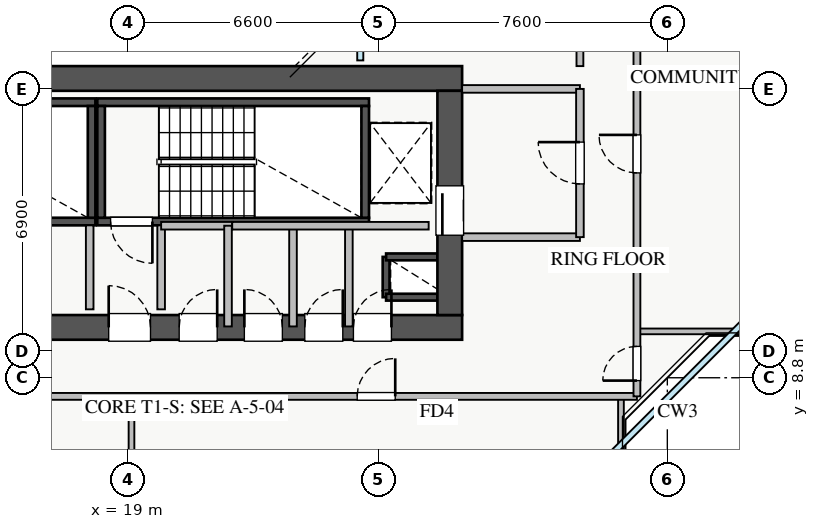
"""IFC4 building model, lengths in metres.
Left out: names, types, materials, properties, quantities, classifications, styles, units other than length and angle.
Written with IfcOpenShell. Run it as: python <this file> out.ifc"""

import sys

from ifc_helpers import new_model, si_unit, direction, frame, frame_2d, origin, place, context, subcontext, project, spatial, rectangle, extrude, source, transform, mapped, element, fill, save


model = new_model("IFC4")
c1 = context("Model", 3, precision=1e-05, world=origin(), true_north=direction((0.0, 1.0)))
c2 = subcontext(c1, "Body", "Model", "MODEL_VIEW")
j1 = project(units=[si_unit("LENGTHUNIT", "METRE"), si_unit("PLANEANGLEUNIT", "RADIAN")], contexts=[c1])
p1 = place(None, origin())
s1 = spatial("IfcSite", under=j1, at=p1, CompositionType="ELEMENT")
p2 = place(p1, origin())
s2 = spatial("IfcBuilding", under=s1, at=p2, CompositionType="ELEMENT")
p3 = place(p2, frame((0.0, 0.0, 103.5)))
s3 = spatial("IfcBuildingStorey", under=s2, at=p3, CompositionType="ELEMENT", Elevation=103.5)
p4 = place(p3, frame((25.8, 10.92, 0.0), z_axis=(0.0, 0.0, 1.0), x_axis=(0.0, 1.0, 0.0)))
e1 = element("IfcWall", 1, at=p4, inside=s3, PredefinedType="SHEAR", context=c2, shape_type="SweptSolid", body=[
    extrude(rectangle(XDim=1.06, YDim=0.18, at=frame_2d((0.53, 0.0))), origin(), (0.0, 0.0, 1.0), 3.07),
])
for number, where, z_axis, x_axis in (
    (2, (25.8, 11.98, 0.0), (0.0, 0.0, 1.0), (1.0, 0.0, 0.0)),
    (3, (25.8, 10.92, 0.0), (0.0, 0.0, 1.0), (1.0, 0.0, 0.0)),
):
    element("IfcWall", number, at=place(p3, frame(where, z_axis=z_axis, x_axis=x_axis)), inside=s3, PredefinedType="SHEAR", context=c2, shape_type="SweptSolid", body=[
        extrude(rectangle(XDim=1.35, YDim=0.18, at=frame_2d((0.675, 0.0))), origin(), (0.0, 0.0, 1.0), 3.07),
    ])
p5 = place(p3, frame((10.85, 12.91, 0.0), z_axis=(0.0, 0.0, 1.0), x_axis=(1.0, 0.0, 0.0)))
e4 = element("IfcWall", 4, at=p5, inside=s3, PredefinedType="SHEAR", context=c2, shape_type="SweptSolid", body=[
    extrude(rectangle(XDim=7.3, YDim=0.2, at=frame_2d((3.65, 0.0))), origin(), (0.0, 0.0, 1.0), 3.25),
])
p6 = place(p5, frame((0.35, 0.0, 0.0)))
e5 = element("IfcOpeningElement", 5, at=p6, cuts=e4, PredefinedType="OPENING", context=c2, shape_type="SweptSolid", body=[
    extrude(rectangle(XDim=1.1, YDim=2.05, at=frame_2d((0.55, 1.025))), frame((0.0, 0.11, 0.0), z_axis=(0.0, -1.0, 0.0), x_axis=(1.0, 0.0, 0.0)), (0.0, 0.0, 1.0), 0.22),
])
p7 = place(p3, frame((10.85, 16.05, 0.0), z_axis=(0.0, 0.0, 1.0), x_axis=(1.0, 0.0, 0.0)))
e6 = element("IfcWall", 6, at=p7, inside=s3, PredefinedType="SHEAR", context=c2, shape_type="SweptSolid", body=[
    extrude(rectangle(XDim=7.3, YDim=0.2, at=frame_2d((3.65, 0.0))), origin(), (0.0, 0.0, 1.0), 3.25),
])
p8 = place(p3, frame((18.05, 13.01, 0.0), z_axis=(0.0, 0.0, 1.0), x_axis=(0.0, 1.0, 0.0)))
e7 = element("IfcWall", 7, at=p8, inside=s3, PredefinedType="SHEAR", context=c2, shape_type="SweptSolid", body=[
    extrude(rectangle(XDim=2.94, YDim=0.2, at=frame_2d((1.47, 0.0))), origin(), (0.0, 0.0, 1.0), 3.25),
])
p9 = place(p3, frame((18.2, 12.91, 0.0), z_axis=(0.0, 0.0, 1.0), x_axis=(1.0, 0.0, 0.0)))
e8 = element("IfcWall", 8, at=p9, inside=s3, PredefinedType="SHEAR", context=c2, shape_type="SweptSolid", body=[
    extrude(rectangle(XDim=7.15, YDim=0.2, at=frame_2d((3.575, 0.0))), origin(), (0.0, 0.0, 1.0), 3.25),
])
p10 = place(p9, frame((0.35, 0.0, 0.0)))
e9 = element("IfcOpeningElement", 9, at=p10, cuts=e8, PredefinedType="OPENING", context=c2, shape_type="SweptSolid", body=[
    extrude(rectangle(XDim=1.1, YDim=2.05, at=frame_2d((0.55, 1.025))), frame((0.0, 0.11, 0.0), z_axis=(0.0, -1.0, 0.0), x_axis=(1.0, 0.0, 0.0)), (0.0, 0.0, 1.0), 0.22),
])
p11 = place(p3, frame((18.2, 16.05, 0.0), z_axis=(0.0, 0.0, 1.0), x_axis=(1.0, 0.0, 0.0)))
e10 = element("IfcWall", 10, at=p11, inside=s3, PredefinedType="SHEAR", context=c2, shape_type="SweptSolid", body=[
    extrude(rectangle(XDim=7.15, YDim=0.2, at=frame_2d((3.575, 0.0))), origin(), (0.0, 0.0, 1.0), 3.25),
])
for number, where, z_axis, x_axis in (
    (11, (18.3, 13.01, 0.0), (0.0, 0.0, 1.0), (0.0, 1.0, 0.0)),
    (12, (25.25, 13.01, 0.0), (0.0, 0.0, 1.0), (0.0, 1.0, 0.0)),
):
    element("IfcWall", number, at=place(p3, frame(where, z_axis=z_axis, x_axis=x_axis)), inside=s3, PredefinedType="SHEAR", context=c2, shape_type="SweptSolid", body=[
        extrude(rectangle(XDim=2.94, YDim=0.2, at=frame_2d((1.47, 0.0))), origin(), (0.0, 0.0, 1.0), 3.25),
    ])
p12 = place(p3, frame((10.2, 10.125, 0.0), z_axis=(0.0, 0.0, 1.0), x_axis=(1.0, 0.0, 0.0)))
e13 = element("IfcWall", 13, at=p12, inside=s3, PredefinedType="SHEAR", context=c2, shape_type="SweptSolid", body=[
    extrude(rectangle(XDim=17.6, YDim=0.65, at=frame_2d((8.8, 0.0))), origin(), (0.0, 0.0, 1.0), 3.25),
])
p13 = place(p12, frame((1.15, 0.0, 0.0)))
e14 = element("IfcOpeningElement", 14, at=p13, cuts=e13, PredefinedType="OPENING", context=c2, shape_type="SweptSolid", body=[
    extrude(rectangle(XDim=1.1, YDim=2.05, at=frame_2d((0.55, 1.025))), frame((0.0, 0.335, 0.0), z_axis=(0.0, -1.0, 0.0), x_axis=(1.0, 0.0, 0.0)), (0.0, 0.0, 1.0), 0.67),
])
p14 = place(p12, frame((8.3, 0.0, 0.0)))
e15 = element("IfcOpeningElement", 15, at=p14, cuts=e13, PredefinedType="OPENING", context=c2, shape_type="SweptSolid", body=[
    extrude(rectangle(XDim=1.1, YDim=2.05, at=frame_2d((0.55, 1.025))), frame((0.0, 0.335, 0.0), z_axis=(0.0, -1.0, 0.0), x_axis=(1.0, 0.0, 0.0)), (0.0, 0.0, 1.0), 0.67),
])
p15 = place(p12, frame((4.9, 0.0, 0.0)))
e16 = element("IfcOpeningElement", 16, at=p15, cuts=e13, PredefinedType="OPENING", context=c2, shape_type="SweptSolid", body=[
    extrude(rectangle(XDim=1.1, YDim=2.05, at=frame_2d((0.55, 1.025))), frame((0.0, 0.335, 0.0), z_axis=(0.0, -1.0, 0.0), x_axis=(1.0, 0.0, 0.0)), (0.0, 0.0, 1.0), 0.67),
])
p16 = place(p12, frame((14.74, 0.0, 0.0)))
e17 = element("IfcOpeningElement", 17, at=p16, cuts=e13, PredefinedType="OPENING", context=c2, shape_type="SweptSolid", body=[
    extrude(rectangle(XDim=1.0, YDim=2.05, at=frame_2d((0.5, 1.025))), frame((0.0, 0.335, 0.0), z_axis=(0.0, -1.0, 0.0), x_axis=(1.0, 0.0, 0.0)), (0.0, 0.0, 1.0), 0.67),
])
p17 = place(p12, frame((10.155, 0.0, 0.0)))
e18 = element("IfcOpeningElement", 18, at=p17, cuts=e13, PredefinedType="OPENING", context=c2, shape_type="SweptSolid", body=[
    extrude(rectangle(XDim=1.0, YDim=2.05, at=frame_2d((0.5, 1.025))), frame((0.0, 0.335, 0.0), z_axis=(0.0, -1.0, 0.0), x_axis=(1.0, 0.0, 0.0)), (0.0, 0.0, 1.0), 0.67),
])
p18 = place(p12, frame((11.87, 0.0, 0.0)))
e19 = element("IfcOpeningElement", 19, at=p18, cuts=e13, PredefinedType="OPENING", context=c2, shape_type="SweptSolid", body=[
    extrude(rectangle(XDim=1.0, YDim=2.05, at=frame_2d((0.5, 1.025))), frame((0.0, 0.335, 0.0), z_axis=(0.0, -1.0, 0.0), x_axis=(1.0, 0.0, 0.0)), (0.0, 0.0, 1.0), 0.67),
])
p19 = place(p12, frame((13.46, 0.0, 0.0)))
e20 = element("IfcOpeningElement", 20, at=p19, cuts=e13, PredefinedType="OPENING", context=c2, shape_type="SweptSolid", body=[
    extrude(rectangle(XDim=1.0, YDim=2.05, at=frame_2d((0.5, 1.025))), frame((0.0, 0.335, 0.0), z_axis=(0.0, -1.0, 0.0), x_axis=(1.0, 0.0, 0.0)), (0.0, 0.0, 1.0), 0.67),
])
p20 = place(p3, frame((10.2, 16.675, 0.0), z_axis=(0.0, 0.0, 1.0), x_axis=(1.0, 0.0, 0.0)))
e21 = element("IfcWall", 21, at=p20, inside=s3, PredefinedType="SHEAR", context=c2, shape_type="SweptSolid", body=[
    extrude(rectangle(XDim=17.6, YDim=0.65, at=frame_2d((8.8, 0.0))), origin(), (0.0, 0.0, 1.0), 3.25),
])
p21 = place(p3, frame((27.475, 10.45, 0.0), z_axis=(0.0, 0.0, 1.0), x_axis=(0.0, 1.0, 0.0)))
e22 = element("IfcWall", 22, at=p21, inside=s3, PredefinedType="SHEAR", context=c2, shape_type="SweptSolid", body=[
    extrude(rectangle(XDim=5.9, YDim=0.65, at=frame_2d((2.95, 0.0))), origin(), (0.0, 0.0, 1.0), 3.25),
])
p22 = place(p21, frame((2.1, 0.0, 0.0)))
e23 = element("IfcOpeningElement", 23, at=p22, cuts=e22, PredefinedType="OPENING", context=c2, shape_type="SweptSolid", body=[
    extrude(rectangle(XDim=1.3, YDim=2.05, at=frame_2d((0.65, 1.025))), frame((0.0, 0.335, 0.0), z_axis=(0.0, -1.0, 0.0), x_axis=(1.0, 0.0, 0.0)), (0.0, 0.0, 1.0), 0.67),
])
for number, where, z_axis, x_axis in (
    (24, (27.8, 16.4, 0.0), (0.0, 0.0, 1.0), (1.0, 0.0, 0.0)),
    (25, (27.8, 12.5, 0.0), (0.0, 0.0, 1.0), (1.0, 0.0, 0.0)),
):
    element("IfcWall", number, at=place(p3, frame(where, z_axis=z_axis, x_axis=x_axis)), inside=s3, PredefinedType="PARTITIONING", context=c2, shape_type="SweptSolid", body=[
        extrude(rectangle(XDim=3.1, YDim=0.2, at=frame_2d((1.55, 0.0))), origin(), (0.0, 0.0, 1.0), 3.07),
    ])
p23 = place(p3, frame((30.9, 12.5, 0.0), z_axis=(0.0, 0.0, 1.0), x_axis=(0.0, 1.0, 0.0)))
e26 = element("IfcWall", 26, at=p23, inside=s3, PredefinedType="PARTITIONING", context=c2, shape_type="SweptSolid", body=[
    extrude(rectangle(XDim=3.9, YDim=0.2, at=frame_2d((1.95, 0.0))), origin(), (0.0, 0.0, 1.0), 3.07),
])
p24 = place(p23, frame((1.4, 0.0, 0.0)))
e27 = element("IfcOpeningElement", 27, at=p24, cuts=e26, PredefinedType="OPENING", context=c2, shape_type="SweptSolid", body=[
    extrude(rectangle(XDim=1.1, YDim=2.05, at=frame_2d((0.55, 1.025))), frame((0.0, 0.11, 0.0), z_axis=(0.0, -1.0, 0.0), x_axis=(1.0, 0.0, 0.0)), (0.0, 0.0, 1.0), 0.22),
])
for number, where, z_axis, x_axis in (
    (28, (18.0, 10.6, 0.0), (0.0, 0.0, 1.0), (0.0, 1.0, 0.0)),
    (29, (19.88, 10.6, 0.0), (0.0, 0.0, 1.0), (0.0, 1.0, 0.0)),
):
    element("IfcWall", number, at=place(p3, frame(where, z_axis=z_axis, x_axis=x_axis)), inside=s3, PredefinedType="PARTITIONING", context=c2, shape_type="SweptSolid", body=[
        extrude(rectangle(XDim=2.21, YDim=0.2, at=frame_2d((1.105, 0.0))), origin(), (0.0, 0.0, 1.0), 3.07),
    ])
p25 = place(p3, frame((24.82, 10.15, 0.0), z_axis=(0.0, 0.0, 1.0), x_axis=(0.0, 1.0, 0.0)))
e30 = element("IfcWall", 30, at=p25, inside=s3, PredefinedType="PARTITIONING", context=c2, shape_type="SweptSolid", body=[
    extrude(rectangle(XDim=2.65, YDim=0.2, at=frame_2d((1.325, 0.0))), origin(), (0.0, 0.0, 1.0), 3.07),
])
p26 = place(p3, frame((19.88, 12.8, 0.0), z_axis=(0.0, 0.0, 1.0), x_axis=(1.0, 0.0, 0.0)))
e31 = element("IfcWall", 31, at=p26, inside=s3, PredefinedType="PARTITIONING", context=c2, shape_type="SweptSolid", body=[
    extrude(rectangle(XDim=1.87, YDim=0.2, at=frame_2d((0.935, 0.0))), origin(), (0.0, 0.0, 1.0), 3.07),
])
for number, where, z_axis, x_axis in (
    (32, (21.64, 10.15, 0.0), (0.0, 0.0, 1.0), (0.0, 1.0, 0.0)),
    (33, (23.35, 10.15, 0.0), (0.0, 0.0, 1.0), (0.0, 1.0, 0.0)),
):
    element("IfcWall", number, at=place(p3, frame(where, z_axis=z_axis, x_axis=x_axis)), inside=s3, PredefinedType="PARTITIONING", context=c2, shape_type="SweptSolid", body=[
        extrude(rectangle(XDim=2.65, YDim=0.2, at=frame_2d((1.325, 0.0))), origin(), (0.0, 0.0, 1.0), 3.07),
    ])
p27 = place(p3, frame((21.75, 12.8, 0.0), z_axis=(0.0, 0.0, 1.0), x_axis=(1.0, 0.0, 0.0)))
e34 = element("IfcWall", 34, at=p27, inside=s3, PredefinedType="PARTITIONING", context=c2, shape_type="SweptSolid", body=[
    extrude(rectangle(XDim=5.17, YDim=0.2, at=frame_2d((2.585, 0.0))), origin(), (0.0, 0.0, 1.0), 3.07),
])
p28 = place(p3, frame((19.1, 5.35, 0.0), z_axis=(0.0, 0.0, 1.0), x_axis=(0.0, 1.0, 0.0)))
e35 = element("IfcWall", 35, at=p28, inside=s3, PredefinedType="PARTITIONING", context=c2, shape_type="SweptSolid", body=[
    extrude(rectangle(XDim=2.96, YDim=0.15, at=frame_2d((1.48, 0.0))), origin(), (0.0, 0.0, 1.0), 2.865),
])
p29 = place(p3, frame((31.98, 5.35, 0.0), z_axis=(0.0, 0.0, 1.0), x_axis=(0.0, 1.0, 0.0)))
e36 = element("IfcWall", 36, at=p29, inside=s3, PredefinedType="PARTITIONING", context=c2, shape_type="SweptSolid", body=[
    extrude(rectangle(XDim=2.96, YDim=0.15, at=frame_2d((1.48, 0.0))), origin(), (0.0, 0.0, 1.0), 3.07),
])
p30 = place(p3, frame((8.82, 8.31, 0.0), z_axis=(0.0, 0.0, 1.0), x_axis=(1.0, 0.0, 0.0)))
e37 = element("IfcWall", 37, at=p30, inside=s3, PredefinedType="PARTITIONING", context=c2, shape_type="SweptSolid", body=[
    extrude(rectangle(XDim=23.58, YDim=0.18, at=frame_2d((11.79, 0.0))), origin(), (0.0, 0.0, 1.0), 3.07),
])
p31 = place(p30, frame((4.64, 0.0, 0.0)))
e38 = element("IfcOpeningElement", 38, at=p31, cuts=e37, PredefinedType="OPENING", context=c2, shape_type="SweptSolid", body=[
    extrude(rectangle(XDim=1.0, YDim=2.05, at=frame_2d((0.5, 1.025))), frame((0.0, 0.1, 0.0), z_axis=(0.0, -1.0, 0.0), x_axis=(1.0, 0.0, 0.0)), (0.0, 0.0, 1.0), 0.2),
])
p32 = place(p30, frame((16.22, 0.0, 0.0)))
e39 = element("IfcOpeningElement", 39, at=p32, cuts=e37, PredefinedType="OPENING", context=c2, shape_type="SweptSolid", body=[
    extrude(rectangle(XDim=1.0, YDim=2.05, at=frame_2d((0.5, 1.025))), frame((0.0, 0.1, 0.0), z_axis=(0.0, -1.0, 0.0), x_axis=(1.0, 0.0, 0.0)), (0.0, 0.0, 1.0), 0.2),
])
p33 = place(p3, frame((32.4, 10.02, 0.0), z_axis=(0.0, 0.0, 1.0), x_axis=(1.0, 0.0, 0.0)))
e40 = element("IfcWall", 40, at=p33, inside=s3, PredefinedType="PARTITIONING", context=c2, shape_type="SweptSolid", body=[
    extrude(rectangle(XDim=4.25, YDim=0.15, at=frame_2d((2.125, 0.0))), origin(), (0.0, 0.0, 1.0), 3.07),
])
p34 = place(p3, frame((32.4, 8.31, 0.0), z_axis=(0.0, 0.0, 1.0), x_axis=(0.0, 1.0, 0.0)))
e41 = element("IfcWall", 41, at=p34, inside=s3, PredefinedType="PARTITIONING", context=c2, shape_type="SweptSolid", body=[
    extrude(rectangle(XDim=29.13, YDim=0.18, at=frame_2d((14.565, 0.0))), origin(), (0.0, 0.0, 1.0), 3.07),
])
p35 = place(p34, frame((27.94, 0.0, 0.0)))
e42 = element("IfcOpeningElement", 42, at=p35, cuts=e41, PredefinedType="OPENING", context=c2, shape_type="SweptSolid", body=[
    extrude(rectangle(XDim=0.9, YDim=2.05, at=frame_2d((0.45, 1.025))), frame((0.0, 0.1, 0.0), z_axis=(0.0, -1.0, 0.0), x_axis=(1.0, 0.0, 0.0)), (0.0, 0.0, 1.0), 0.2),
])
p36 = place(p34, frame((0.415, 0.0, 0.0)))
e43 = element("IfcOpeningElement", 43, at=p36, cuts=e41, PredefinedType="OPENING", context=c2, shape_type="SweptSolid", body=[
    extrude(rectangle(XDim=0.9, YDim=2.05, at=frame_2d((0.45, 1.025))), frame((0.0, 0.1, 0.0), z_axis=(0.0, -1.0, 0.0), x_axis=(1.0, 0.0, 0.0)), (0.0, 0.0, 1.0), 0.2),
])
p37 = place(p34, frame((5.88, 0.0, 0.0)))
e44 = element("IfcOpeningElement", 44, at=p37, cuts=e41, PredefinedType="OPENING", context=c2, shape_type="SweptSolid", body=[
    extrude(rectangle(XDim=1.0, YDim=2.05, at=frame_2d((0.5, 1.025))), frame((0.0, 0.1, 0.0), z_axis=(0.0, -1.0, 0.0), x_axis=(1.0, 0.0, 0.0)), (0.0, 0.0, 1.0), 0.2),
])
p38 = place(p34, frame((12.23, 0.0, 0.0)))
e45 = element("IfcOpeningElement", 45, at=p38, cuts=e41, PredefinedType="OPENING", context=c2, shape_type="SweptSolid", body=[
    extrude(rectangle(XDim=1.0, YDim=2.05, at=frame_2d((0.5, 1.025))), frame((0.0, 0.1, 0.0), z_axis=(0.0, -1.0, 0.0), x_axis=(1.0, 0.0, 0.0)), (0.0, 0.0, 1.0), 0.2),
])
p39 = place(p34, frame((20.835, 0.0, 0.0)))
e46 = element("IfcOpeningElement", 46, at=p39, cuts=e41, PredefinedType="OPENING", context=c2, shape_type="SweptSolid", body=[
    extrude(rectangle(XDim=1.0, YDim=2.05, at=frame_2d((0.5, 1.025))), frame((0.0, 0.1, 0.0), z_axis=(0.0, -1.0, 0.0), x_axis=(1.0, 0.0, 0.0)), (0.0, 0.0, 1.0), 0.2),
])
p40 = place(p3, frame((30.9, 17.0, 0.0), z_axis=(0.0, 0.0, 1.0), x_axis=(0.0, 1.0, 0.0)))
e47 = element("IfcWall", 47, at=p40, inside=s3, PredefinedType="PARTITIONING", context=c2, shape_type="SweptSolid", body=[
    extrude(rectangle(XDim=12.0, YDim=0.18, at=frame_2d((6.0, 0.0))), origin(), (0.0, 0.0, 1.0), 3.07),
])
p41 = place(p40, frame((0.84, 0.0, 0.0)))
e48 = element("IfcOpeningElement", 48, at=p41, cuts=e47, PredefinedType="OPENING", context=c2, shape_type="SweptSolid", body=[
    extrude(rectangle(XDim=1.0, YDim=2.05, at=frame_2d((0.5, 1.025))), frame((0.0, 0.1, 0.0), z_axis=(0.0, -1.0, 0.0), x_axis=(1.0, 0.0, 0.0)), (0.0, 0.0, 1.0), 0.2),
])
p42 = place(p40, frame((6.69, 0.0, 0.0)))
e49 = element("IfcOpeningElement", 49, at=p42, cuts=e47, PredefinedType="OPENING", context=c2, shape_type="SweptSolid", body=[
    extrude(rectangle(XDim=1.0, YDim=2.05, at=frame_2d((0.5, 1.025))), frame((0.0, 0.1, 0.0), z_axis=(0.0, -1.0, 0.0), x_axis=(1.0, 0.0, 0.0)), (0.0, 0.0, 1.0), 0.2),
])
m1 = source(origin(), c2, "Body", "SweptSolid", [
    extrude(rectangle(XDim=1.3, YDim=2.05, at=frame_2d((0.65, 1.025))), frame((0.0, 0.025, 0.0), z_axis=(0.0, -1.0, 0.0), x_axis=(1.0, 0.0, 0.0)), (0.0, 0.0, 1.0), 0.05),
])
p43 = place(p22, origin())
e50 = element("IfcDoor", 50, at=p43, inside=s3, OperationType="SLIDING_TO_RIGHT", PredefinedType="DOOR", context=c2, shape_type="MappedRepresentation", body=[
    mapped(m1, transform((0.0, 0.0, 0.0), x_axis=(1.0, 0.0, 0.0), y_axis=(0.0, 1.0, 0.0), z_axis=(0.0, 0.0, 1.0), scale=1.0)),
])
fill(e23, e50)
m2 = source(origin(), c2, "Body", "SweptSolid", [
    extrude(rectangle(XDim=1.1, YDim=2.05, at=frame_2d((0.55, 1.025))), frame((0.0, 0.025, 0.0), z_axis=(0.0, -1.0, 0.0), x_axis=(1.0, 0.0, 0.0)), (0.0, 0.0, 1.0), 0.05),
])
p44 = place(p14, origin())
e51 = element("IfcDoor", 51, at=p44, inside=s3, OperationType="SINGLE_SWING_LEFT", PredefinedType="DOOR", context=c2, shape_type="MappedRepresentation", body=[
    mapped(m2, transform((0.0, 0.0, 0.0), x_axis=(1.0, 0.0, 0.0), y_axis=(0.0, 1.0, 0.0), z_axis=(0.0, 0.0, 1.0), scale=1.0)),
])
fill(e15, e51)
p45 = place(p10, frame((1.1, 0.0, 0.0), z_axis=(0.0, 0.0, 1.0), x_axis=(-1.0, 0.0, 0.0)))
e52 = element("IfcDoor", 52, at=p45, inside=s3, OperationType="SINGLE_SWING_RIGHT", PredefinedType="DOOR", context=c2, shape_type="MappedRepresentation", body=[
    mapped(m2, transform((0.0, 0.0, 0.0), x_axis=(1.0, 0.0, 0.0), y_axis=(0.0, 1.0, 0.0), z_axis=(0.0, 0.0, 1.0), scale=1.0)),
])
fill(e9, e52)
m3 = source(origin(), c2, "Body", "SweptSolid", [
    extrude(rectangle(XDim=1.0, YDim=2.05, at=frame_2d((0.5, 1.025))), frame((0.0, 0.025, 0.0), z_axis=(0.0, -1.0, 0.0), x_axis=(1.0, 0.0, 0.0)), (0.0, 0.0, 1.0), 0.05),
])
p46 = place(p16, origin())
e53 = element("IfcDoor", 53, at=p46, inside=s3, OperationType="SINGLE_SWING_RIGHT", PredefinedType="DOOR", context=c2, shape_type="MappedRepresentation", body=[
    mapped(m3, transform((0.0, 0.0, 0.0), x_axis=(1.0, 0.0, 0.0), y_axis=(0.0, 1.0, 0.0), z_axis=(0.0, 0.0, 1.0), scale=1.0)),
])
fill(e17, e53)
p47 = place(p17, origin())
e54 = element("IfcDoor", 54, at=p47, inside=s3, OperationType="SINGLE_SWING_RIGHT", PredefinedType="DOOR", context=c2, shape_type="MappedRepresentation", body=[
    mapped(m3, transform((0.0, 0.0, 0.0), x_axis=(1.0, 0.0, 0.0), y_axis=(0.0, 1.0, 0.0), z_axis=(0.0, 0.0, 1.0), scale=1.0)),
])
fill(e18, e54)
p48 = place(p18, origin())
e55 = element("IfcDoor", 55, at=p48, inside=s3, OperationType="SINGLE_SWING_LEFT", PredefinedType="DOOR", context=c2, shape_type="MappedRepresentation", body=[
    mapped(m3, transform((0.0, 0.0, 0.0), x_axis=(1.0, 0.0, 0.0), y_axis=(0.0, 1.0, 0.0), z_axis=(0.0, 0.0, 1.0), scale=1.0)),
])
fill(e19, e55)
p49 = place(p19, origin())
e56 = element("IfcDoor", 56, at=p49, inside=s3, OperationType="SINGLE_SWING_RIGHT", PredefinedType="DOOR", context=c2, shape_type="MappedRepresentation", body=[
    mapped(m3, transform((0.0, 0.0, 0.0), x_axis=(1.0, 0.0, 0.0), y_axis=(0.0, 1.0, 0.0), z_axis=(0.0, 0.0, 1.0), scale=1.0)),
])
fill(e20, e56)
p50 = place(p24, origin())
e57 = element("IfcDoor", 57, at=p50, inside=s3, OperationType="SINGLE_SWING_RIGHT", PredefinedType="DOOR", context=c2, shape_type="MappedRepresentation", body=[
    mapped(m2, transform((0.0, 0.0, 0.0), x_axis=(1.0, 0.0, 0.0), y_axis=(0.0, 1.0, 0.0), z_axis=(0.0, 0.0, 1.0), scale=1.0)),
])
fill(e27, e57)
p51 = place(p32, origin())
e58 = element("IfcDoor", 58, at=p51, inside=s3, OperationType="SINGLE_SWING_RIGHT", PredefinedType="DOOR", context=c2, shape_type="MappedRepresentation", body=[
    mapped(m3, transform((0.0, 0.0, 0.0), x_axis=(1.0, 0.0, 0.0), y_axis=(0.0, 1.0, 0.0), z_axis=(0.0, 0.0, 1.0), scale=1.0)),
])
fill(e39, e58)
m4 = source(origin(), c2, "Body", "SweptSolid", [
    extrude(rectangle(XDim=0.9, YDim=2.05, at=frame_2d((0.45, 1.025))), frame((0.0, 0.025, 0.0), z_axis=(0.0, -1.0, 0.0), x_axis=(1.0, 0.0, 0.0)), (0.0, 0.0, 1.0), 0.05),
])
p52 = place(p36, origin())
e59 = element("IfcDoor", 59, at=p52, inside=s3, OperationType="SINGLE_SWING_LEFT", PredefinedType="DOOR", context=c2, shape_type="MappedRepresentation", body=[
    mapped(m4, transform((0.0, 0.0, 0.0), x_axis=(1.0, 0.0, 0.0), y_axis=(0.0, 1.0, 0.0), z_axis=(0.0, 0.0, 1.0), scale=1.0)),
])
fill(e43, e59)
p53 = place(p37, origin())
e60 = element("IfcDoor", 60, at=p53, inside=s3, OperationType="SINGLE_SWING_RIGHT", PredefinedType="DOOR", context=c2, shape_type="MappedRepresentation", body=[
    mapped(m3, transform((0.0, 0.0, 0.0), x_axis=(1.0, 0.0, 0.0), y_axis=(0.0, 1.0, 0.0), z_axis=(0.0, 0.0, 1.0), scale=1.0)),
])
fill(e44, e60)
save(model, sys.argv[1])
